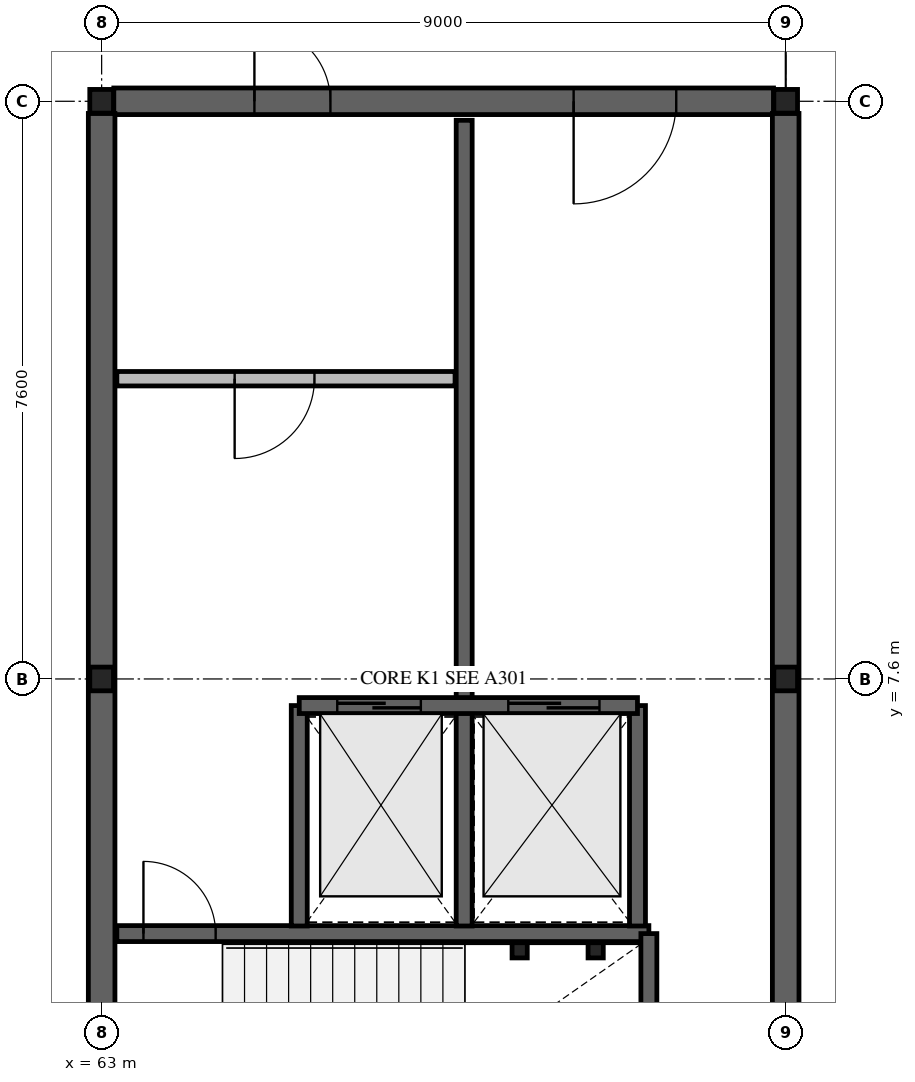
"""IFC4 building model, lengths in metres.
Left out: names, types, materials, properties, quantities, classifications, styles, units other than length and angle.
Written with IfcOpenShell. Run it as: python <this file> out.ifc"""

import sys

from ifc_helpers import new_model, si_unit, direction, frame, frame_2d, origin, origin_2d, place, context, subcontext, project, spatial, rectangle, hollow_rectangle, i_section, extrude, element, fill, save


model = new_model("IFC4")
c1 = context("Model", 3, precision=1e-05, world=origin(), true_north=direction((0.0, 1.0)))
c2 = subcontext(c1, "Body", "Model", "MODEL_VIEW")
j1 = project(units=[si_unit("LENGTHUNIT", "METRE"), si_unit("PLANEANGLEUNIT", "RADIAN")], contexts=[c1])
p1 = place(None, origin())
s1 = spatial("IfcSite", under=j1, at=p1, CompositionType="ELEMENT")
p2 = place(p1, origin())
s2 = spatial("IfcBuilding", under=s1, at=p2, CompositionType="ELEMENT")
p3 = place(p2, frame((0.0, 0.0, 9.36)))
s3 = spatial("IfcBuildingStorey", under=s2, at=p3, CompositionType="ELEMENT", Elevation=9.36)
for number, where, z_axis, x_axis in (
    (1, (63.0, 7.6, 0.0), (0.0, 0.0, 1.0), (1.0, 0.0, 0.0)),
    (2, (63.0, 15.2, 0.0), (0.0, 0.0, 1.0), (1.0, 0.0, 0.0)),
    (3, (72.0, 7.6, 0.0), (0.0, 0.0, 1.0), (1.0, 0.0, 0.0)),
    (4, (72.0, 15.2, 0.0), (0.0, 0.0, 1.0), (1.0, 0.0, 0.0)),
):
    element("IfcColumn", number, at=place(p3, frame(where, z_axis=z_axis, x_axis=x_axis)), inside=s3, PredefinedType="COLUMN", context=c2, shape_type="SweptSolid", body=[
        extrude(i_section(OverallWidth=0.312, OverallDepth=0.312, WebThickness=0.017, FlangeThickness=0.017, FilletRadius=0.015, at=origin_2d()), origin(), (0.0, 0.0, 1.0), 4.32),
    ])
p4 = place(p3, frame((63.16, 15.2, 0.0), z_axis=(0.0, 0.0, 1.0), x_axis=(1.0, 0.0, 0.0)))
e5 = element("IfcWall", 5, at=p4, inside=s3, PredefinedType="SHEAR", context=c2, shape_type="SweptSolid", body=[
    extrude(rectangle(XDim=8.68, YDim=0.35, at=frame_2d((4.34, 0.0))), origin(), (0.0, 0.0, 1.0), 4.04),
])
p5 = place(p4, frame((1.85, 0.0, 0.0)))
e6 = element("IfcOpeningElement", 6, at=p5, cuts=e5, PredefinedType="OPENING", context=c2, shape_type="SweptSolid", body=[
    extrude(rectangle(XDim=1.0, YDim=2.15, at=frame_2d((0.5, 1.075))), frame((0.0, 0.185, 0.0), z_axis=(0.0, -1.0, 0.0), x_axis=(1.0, 0.0, 0.0)), (0.0, 0.0, 1.0), 0.37),
])
p6 = place(p4, frame((6.05, 0.0, 0.0)))
e7 = element("IfcOpeningElement", 7, at=p6, cuts=e5, PredefinedType="OPENING", context=c2, shape_type="SweptSolid", body=[
    extrude(rectangle(XDim=1.35, YDim=2.18, at=frame_2d((0.675, 1.09))), frame((0.0, 0.185, 0.0), z_axis=(0.0, -1.0, 0.0), x_axis=(1.0, 0.0, 0.0)), (0.0, 0.0, 1.0), 0.37),
])
for number, where, z_axis, x_axis in (
    (8, (63.0, 0.16, 0.0), (0.0, 0.0, 1.0), (0.0, 1.0, 0.0)),
    (9, (72.0, 0.16, 0.0), (0.0, 0.0, 1.0), (0.0, 1.0, 0.0)),
):
    element("IfcWall", number, at=place(p3, frame(where, z_axis=z_axis, x_axis=x_axis)), inside=s3, PredefinedType="SHEAR", context=c2, shape_type="SweptSolid", body=[
        extrude(rectangle(XDim=14.88, YDim=0.35, at=frame_2d((7.44, 0.0))), origin(), (0.0, 0.0, 1.0), 4.04),
    ])
p7 = place(p3, frame((63.2, 4.25, 0.0), z_axis=(0.0, 0.0, 1.0), x_axis=(1.0, 0.0, 0.0)))
e10 = element("IfcWall", 10, at=p7, inside=s3, PredefinedType="SOLIDWALL", context=c2, shape_type="SweptSolid", body=[
    extrude(rectangle(XDim=7.0, YDim=0.21, at=frame_2d((3.5, 0.0))), origin(), (0.0, 0.0, 1.0), 4.04),
])
p8 = place(p7, frame((0.35, 0.0, 0.0)))
e11 = element("IfcOpeningElement", 11, at=p8, cuts=e10, PredefinedType="OPENING", context=c2, shape_type="SweptSolid", body=[
    extrude(rectangle(XDim=0.95, YDim=2.12, at=frame_2d((0.475, 1.06))), frame((0.0, 0.115, 0.0), z_axis=(0.0, -1.0, 0.0), x_axis=(1.0, 0.0, 0.0)), (0.0, 0.0, 1.0), 0.23),
])
p9 = place(p3, frame((70.2, 0.2, 0.0), z_axis=(0.0, 0.0, 1.0), x_axis=(0.0, 1.0, 0.0)))
e12 = element("IfcWall", 12, at=p9, inside=s3, PredefinedType="SOLIDWALL", context=c2, shape_type="SweptSolid", body=[
    extrude(rectangle(XDim=4.05, YDim=0.21, at=frame_2d((2.025, 0.0))), origin(), (0.0, 0.0, 1.0), 4.04),
])
p10 = place(p3, frame((65.6, 4.35, 0.0), z_axis=(0.0, 0.0, 1.0), x_axis=(0.0, 1.0, 0.0)))
e13 = element("IfcWall", 13, at=p10, inside=s3, PredefinedType="SOLIDWALL", context=c2, shape_type="SweptSolid", body=[
    extrude(rectangle(XDim=2.9, YDim=0.21, at=frame_2d((1.45, 0.0))), origin(), (0.0, 0.0, 1.0), 4.04),
])
p11 = place(p3, frame((67.77, 4.35, 0.0), z_axis=(0.0, 0.0, 1.0), x_axis=(0.0, 1.0, 0.0)))
e14 = element("IfcWall", 14, at=p11, inside=s3, PredefinedType="SOLIDWALL", context=c2, shape_type="SweptSolid", body=[
    extrude(rectangle(XDim=10.6, YDim=0.21, at=frame_2d((5.3, 0.0))), origin(), (0.0, 0.0, 1.0), 4.04),
])
p12 = place(p3, frame((70.05, 4.35, 0.0), z_axis=(0.0, 0.0, 1.0), x_axis=(0.0, 1.0, 0.0)))
e15 = element("IfcWall", 15, at=p12, inside=s3, PredefinedType="SOLIDWALL", context=c2, shape_type="SweptSolid", body=[
    extrude(rectangle(XDim=2.9, YDim=0.21, at=frame_2d((1.45, 0.0))), origin(), (0.0, 0.0, 1.0), 4.04),
])
p13 = place(p3, frame((65.6, 7.25, 0.0), z_axis=(0.0, 0.0, 1.0), x_axis=(1.0, 0.0, 0.0)))
e16 = element("IfcWall", 16, at=p13, inside=s3, PredefinedType="SOLIDWALL", context=c2, shape_type="SweptSolid", body=[
    extrude(rectangle(XDim=4.45, YDim=0.21, at=frame_2d((2.225, 0.0))), origin(), (0.0, 0.0, 1.0), 4.04),
])
p14 = place(p13, frame((0.5, 0.0, 0.0)))
e17 = element("IfcOpeningElement", 17, at=p14, cuts=e16, PredefinedType="OPENING", context=c2, shape_type="SweptSolid", body=[
    extrude(rectangle(XDim=1.1, YDim=2.14, at=frame_2d((0.55, 1.07))), frame((0.0, 0.115, 0.0), z_axis=(0.0, -1.0, 0.0), x_axis=(1.0, 0.0, 0.0)), (0.0, 0.0, 1.0), 0.23),
])
p15 = place(p13, frame((2.75, 0.0, 0.0)))
e18 = element("IfcOpeningElement", 18, at=p15, cuts=e16, PredefinedType="OPENING", context=c2, shape_type="SweptSolid", body=[
    extrude(rectangle(XDim=1.2, YDim=2.18, at=frame_2d((0.6, 1.09))), frame((0.0, 0.115, 0.0), z_axis=(0.0, -1.0, 0.0), x_axis=(1.0, 0.0, 0.0)), (0.0, 0.0, 1.0), 0.23),
])
p16 = place(p3, frame((63.2, 11.55, 0.0), z_axis=(0.0, 0.0, 1.0), x_axis=(1.0, 0.0, 0.0)))
e19 = element("IfcWall", 19, at=p16, inside=s3, PredefinedType="SOLIDWALL", context=c2, shape_type="SweptSolid", body=[
    extrude(rectangle(XDim=4.45, YDim=0.19, at=frame_2d((2.225, 0.0))), origin(), (0.0, 0.0, 1.0), 4.04),
])
p17 = place(p16, frame((1.55, 0.0, 0.0)))
e20 = element("IfcOpeningElement", 20, at=p17, cuts=e19, PredefinedType="OPENING", context=c2, shape_type="SweptSolid", body=[
    extrude(rectangle(XDim=1.05, YDim=2.12, at=frame_2d((0.525, 1.06))), frame((0.0, 0.105, 0.0), z_axis=(0.0, -1.0, 0.0), x_axis=(1.0, 0.0, 0.0)), (0.0, 0.0, 1.0), 0.21),
])
for number, where, z_axis, x_axis in (
    (21, (68.5, 4.03, 0.0), (0.0, 0.0, 1.0), (1.0, 0.0, 0.0)),
    (22, (69.5, 4.03, 0.0), (0.0, 0.0, 1.0), (1.0, 0.0, 0.0)),
):
    element("IfcColumn", number, at=place(p3, frame(where, z_axis=z_axis, x_axis=x_axis)), inside=s3, PredefinedType="COLUMN", context=c2, shape_type="SweptSolid", body=[
        extrude(hollow_rectangle(XDim=0.2, YDim=0.2, WallThickness=0.012, at=origin_2d()), origin(), (0.0, 0.0, 1.0), 4.32),
    ])
p18 = place(p8, origin())
e23 = element("IfcDoor", 23, at=p18, inside=s3, OperationType="SINGLE_SWING_LEFT", PredefinedType="DOOR", context=c2, shape_type="SweptSolid", body=[
    extrude(rectangle(XDim=0.95, YDim=2.12, at=frame_2d((0.475, 1.06))), frame((0.0, 0.025, 0.0), z_axis=(0.0, -1.0, 0.0), x_axis=(1.0, 0.0, 0.0)), (0.0, 0.0, 1.0), 0.05),
])
fill(e11, e23)
p19 = place(p14, origin())
e24 = element("IfcDoor", 24, at=p19, inside=s3, OperationType="SLIDING_TO_LEFT", PredefinedType="DOOR", context=c2, shape_type="SweptSolid", body=[
    extrude(rectangle(XDim=1.1, YDim=2.14, at=frame_2d((0.55, 1.07))), frame((0.0, 0.025, 0.0), z_axis=(0.0, -1.0, 0.0), x_axis=(1.0, 0.0, 0.0)), (0.0, 0.0, 1.0), 0.05),
])
fill(e17, e24)
p20 = place(p15, origin())
e25 = element("IfcDoor", 25, at=p20, inside=s3, OperationType="SLIDING_TO_LEFT", PredefinedType="DOOR", context=c2, shape_type="SweptSolid", body=[
    extrude(rectangle(XDim=1.2, YDim=2.18, at=frame_2d((0.6, 1.09))), frame((0.0, 0.025, 0.0), z_axis=(0.0, -1.0, 0.0), x_axis=(1.0, 0.0, 0.0)), (0.0, 0.0, 1.0), 0.05),
])
fill(e18, e25)
p21 = place(p17, origin())
e26 = element("IfcDoor", 26, at=p21, inside=s3, OperationType="SINGLE_SWING_RIGHT", PredefinedType="DOOR", context=c2, shape_type="SweptSolid", body=[
    extrude(rectangle(XDim=1.05, YDim=2.12, at=frame_2d((0.525, 1.06))), frame((0.0, 0.025, 0.0), z_axis=(0.0, -1.0, 0.0), x_axis=(1.0, 0.0, 0.0)), (0.0, 0.0, 1.0), 0.05),
])
fill(e20, e26)
p22 = place(p5, origin())
e27 = element("IfcDoor", 27, at=p22, inside=s3, OperationType="SINGLE_SWING_LEFT", PredefinedType="DOOR", context=c2, shape_type="SweptSolid", body=[
    extrude(rectangle(XDim=1.0, YDim=2.15, at=frame_2d((0.5, 1.075))), frame((0.0, 0.025, 0.0), z_axis=(0.0, -1.0, 0.0), x_axis=(1.0, 0.0, 0.0)), (0.0, 0.0, 1.0), 0.05),
])
fill(e6, e27)
p23 = place(p6, origin())
e28 = element("IfcDoor", 28, at=p23, inside=s3, OperationType="SINGLE_SWING_RIGHT", PredefinedType="DOOR", context=c2, shape_type="SweptSolid", body=[
    extrude(rectangle(XDim=1.35, YDim=2.18, at=frame_2d((0.675, 1.09))), frame((0.0, 0.025, 0.0), z_axis=(0.0, -1.0, 0.0), x_axis=(1.0, 0.0, 0.0)), (0.0, 0.0, 1.0), 0.05),
])
fill(e7, e28)
save(model, sys.argv[1])
